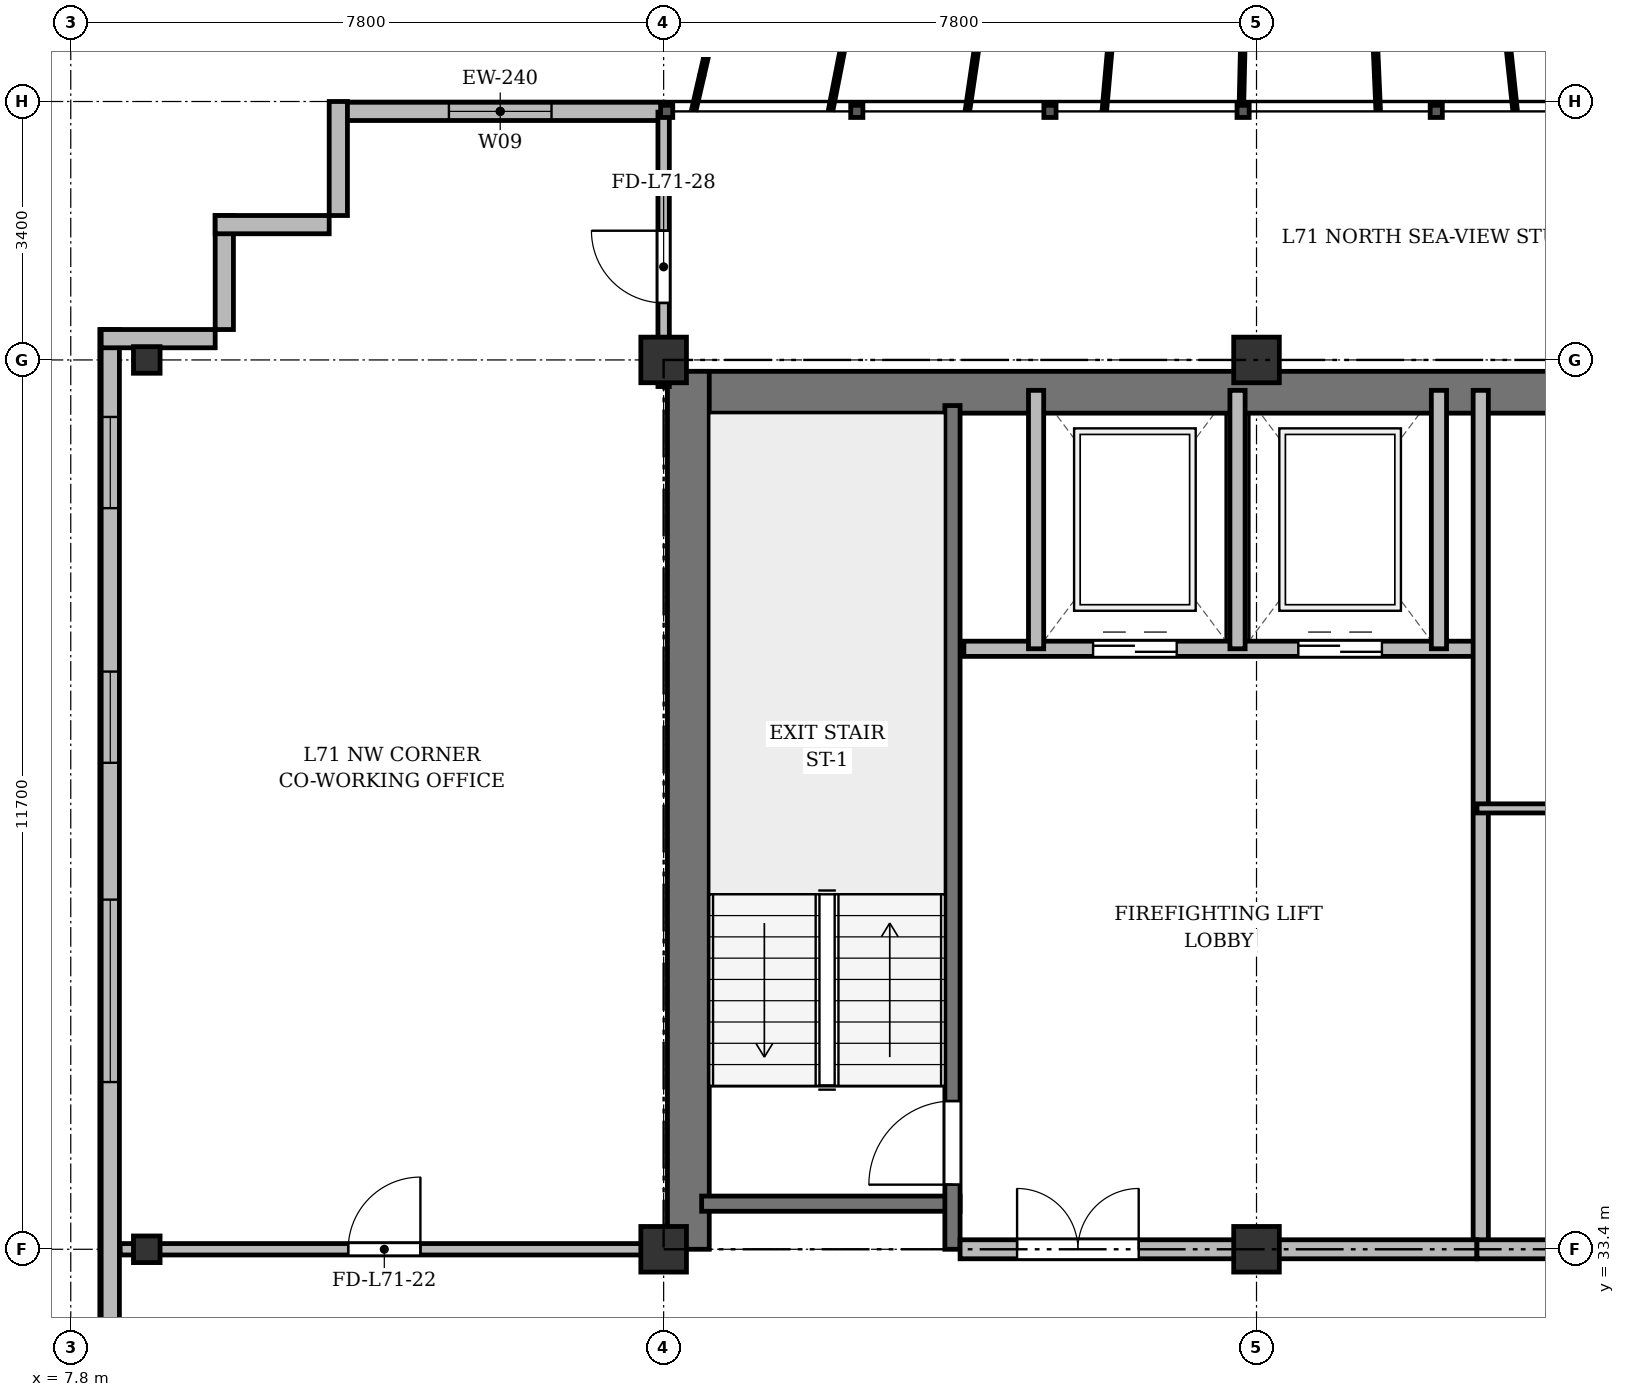
"""IFC4 building model, lengths in metres.
Left out: names, types, materials, properties, quantities, classifications, styles, units other than length and angle.
Written with IfcOpenShell. Run it as: python <this file> out.ifc"""

import sys

from ifc_helpers import new_model, si_unit, direction, frame, frame_2d, origin, origin_2d, place, context, subcontext, project, spatial, rectangle, i_section, extrude, source, transform, mapped, element, fill, save


model = new_model("IFC4")
c1 = context("Model", 3, precision=1e-05, world=origin(), true_north=direction((0.0, 1.0)))
c2 = subcontext(c1, "Body", "Model", "MODEL_VIEW")
j1 = project(units=[si_unit("LENGTHUNIT", "METRE"), si_unit("PLANEANGLEUNIT", "RADIAN")], contexts=[c1])
p1 = place(None, origin())
s1 = spatial("IfcSite", under=j1, at=p1, CompositionType="ELEMENT")
p2 = place(p1, origin())
s2 = spatial("IfcBuilding", under=s1, at=p2, CompositionType="ELEMENT")
p3 = place(p2, frame((0.0, 0.0, 273.9)))
s3 = spatial("IfcBuildingStorey", under=s2, at=p3, CompositionType="ELEMENT", Elevation=273.9)
m1 = source(origin(), c2, "Body", "SweptSolid", [
    extrude(i_section(OverallWidth=0.35, OverallDepth=0.35, WebThickness=0.018, FlangeThickness=0.028, at=origin_2d()), origin(), (0.0, 0.0, 1.0), 3.6),
])
for number, where, z_axis, x_axis in (
    (1, (8.8, 33.4, 0.0), (0.0, 0.0, 1.0), (1.0, 0.0, 0.0)),
    (2, (8.8, 45.1, 0.0), (0.0, 0.0, 1.0), (1.0, 0.0, 0.0)),
):
    element("IfcColumn", number, at=place(p3, frame(where, z_axis=z_axis, x_axis=x_axis)), inside=s3, PredefinedType="COLUMN", context=c2, shape_type="MappedRepresentation", body=[
        mapped(m1, transform((0.0, 0.0, 0.0), x_axis=(1.0, 0.0, 0.0), y_axis=(0.0, 1.0, 0.0), z_axis=(0.0, 0.0, 1.0), scale=1.0)),
    ])
m2 = source(origin(), c2, "Body", "SweptSolid", [
    extrude(rectangle(XDim=0.6, YDim=0.6, at=origin_2d()), origin(), (0.0, 0.0, 1.0), 3.6),
])
for number, where, z_axis, x_axis in (
    (3, (15.6, 33.4, 0.0), (0.0, 0.0, 1.0), (1.0, 0.0, 0.0)),
    (4, (15.6, 45.1, 0.0), (0.0, 0.0, 1.0), (1.0, 0.0, 0.0)),
    (5, (23.4, 33.4, 0.0), (0.0, 0.0, 1.0), (1.0, 0.0, 0.0)),
    (6, (23.4, 45.1, 0.0), (0.0, 0.0, 1.0), (1.0, 0.0, 0.0)),
):
    element("IfcColumn", number, at=place(p3, frame(where, z_axis=z_axis, x_axis=x_axis)), inside=s3, PredefinedType="COLUMN", context=c2, shape_type="MappedRepresentation", body=[
        mapped(m2, transform((0.0, 0.0, 0.0), x_axis=(1.0, 0.0, 0.0), y_axis=(0.0, 1.0, 0.0), z_axis=(0.0, 0.0, 1.0), scale=1.0)),
    ])
p4 = place(p3, frame((11.3, 48.37, 0.0), z_axis=(0.0, 0.0, 1.0), x_axis=(1.0, 0.0, 0.0)))
e7 = element("IfcWall", 7, at=p4, inside=s3, PredefinedType="SOLIDWALL", context=c2, shape_type="SweptSolid", body=[
    extrude(rectangle(XDim=4.3, YDim=0.24, at=frame_2d((2.15, 0.0))), origin(), (0.0, 0.0, 1.0), 3.37),
])
p5 = place(p4, frame((1.475, 0.0, 0.9)))
e8 = element("IfcOpeningElement", 8, at=p5, cuts=e7, PredefinedType="OPENING", context=c2, shape_type="SweptSolid", body=[
    extrude(rectangle(XDim=1.35, YDim=1.5, at=frame_2d((0.675, 0.75))), frame((0.0, 0.13, 0.0), z_axis=(0.0, -1.0, 0.0), x_axis=(1.0, 0.0, 0.0)), (0.0, 0.0, 1.0), 0.26),
])
p6 = place(p3, frame((8.32, 6.5, 0.0), z_axis=(0.0, 0.0, 1.0), x_axis=(0.0, 1.0, 0.0)))
e9 = element("IfcWall", 9, at=p6, inside=s3, PredefinedType="SOLIDWALL", context=c2, shape_type="SweptSolid", body=[
    extrude(rectangle(XDim=39.0, YDim=0.24, at=frame_2d((19.5, 0.0))), origin(), (0.0, 0.0, 1.0), 3.37),
])
p7 = place(p6, frame((1.45, 0.0, 0.92)))
e10 = element("IfcOpeningElement", 10, at=p7, cuts=e9, PredefinedType="OPENING", context=c2, shape_type="SweptSolid", body=[
    extrude(rectangle(XDim=1.2, YDim=1.65, at=frame_2d((0.6, 0.825))), frame((0.0, 0.13, 0.0), z_axis=(0.0, -1.0, 0.0), x_axis=(1.0, 0.0, 0.0)), (0.0, 0.0, 1.0), 0.26),
])
p8 = place(p6, frame((3.7, 0.0, 0.92)))
e11 = element("IfcOpeningElement", 11, at=p8, cuts=e9, PredefinedType="OPENING", context=c2, shape_type="SweptSolid", body=[
    extrude(rectangle(XDim=2.4, YDim=2.1, at=frame_2d((1.2, 1.05))), frame((0.0, 0.13, 0.0), z_axis=(0.0, -1.0, 0.0), x_axis=(1.0, 0.0, 0.0)), (0.0, 0.0, 1.0), 0.26),
])
p9 = place(p6, frame((7.9, 0.0, 0.92)))
e12 = element("IfcOpeningElement", 12, at=p9, cuts=e9, PredefinedType="OPENING", context=c2, shape_type="SweptSolid", body=[
    extrude(rectangle(XDim=2.4, YDim=2.1, at=frame_2d((1.2, 1.05))), frame((0.0, 0.13, 0.0), z_axis=(0.0, -1.0, 0.0), x_axis=(1.0, 0.0, 0.0)), (0.0, 0.0, 1.0), 0.26),
])
p10 = place(p6, frame((15.1, 0.0, 0.92)))
e13 = element("IfcOpeningElement", 13, at=p10, cuts=e9, PredefinedType="OPENING", context=c2, shape_type="SweptSolid", body=[
    extrude(rectangle(XDim=2.4, YDim=2.1, at=frame_2d((1.2, 1.05))), frame((0.0, 0.13, 0.0), z_axis=(0.0, -1.0, 0.0), x_axis=(1.0, 0.0, 0.0)), (0.0, 0.0, 1.0), 0.26),
])
p11 = place(p6, frame((29.1, 0.0, 0.92)))
e14 = element("IfcOpeningElement", 14, at=p11, cuts=e9, PredefinedType="OPENING", context=c2, shape_type="SweptSolid", body=[
    extrude(rectangle(XDim=2.4, YDim=2.1, at=frame_2d((1.2, 1.05))), frame((0.0, 0.13, 0.0), z_axis=(0.0, -1.0, 0.0), x_axis=(1.0, 0.0, 0.0)), (0.0, 0.0, 1.0), 0.26),
])
p12 = place(p6, frame((33.3, 0.0, 0.92)))
e15 = element("IfcOpeningElement", 15, at=p12, cuts=e9, PredefinedType="OPENING", context=c2, shape_type="SweptSolid", body=[
    extrude(rectangle(XDim=1.2, YDim=1.65, at=frame_2d((0.6, 0.825))), frame((0.0, 0.13, 0.0), z_axis=(0.0, -1.0, 0.0), x_axis=(1.0, 0.0, 0.0)), (0.0, 0.0, 1.0), 0.26),
])
p13 = place(p6, frame((36.65, 0.0, 0.92)))
e16 = element("IfcOpeningElement", 16, at=p13, cuts=e9, PredefinedType="OPENING", context=c2, shape_type="SweptSolid", body=[
    extrude(rectangle(XDim=1.2, YDim=1.65, at=frame_2d((0.6, 0.825))), frame((0.0, 0.13, 0.0), z_axis=(0.0, -1.0, 0.0), x_axis=(1.0, 0.0, 0.0)), (0.0, 0.0, 1.0), 0.26),
])
for number, where, z_axis, x_axis in (
    (17, (8.2, 45.38, 0.0), (0.0, 0.0, 1.0), (1.0, 0.0, 0.0)),
    (18, (9.82, 45.5, 0.0), (0.0, 0.0, 1.0), (0.0, 1.0, 0.0)),
    (19, (9.7, 46.88, 0.0), (0.0, 0.0, 1.0), (1.0, 0.0, 0.0)),
    (20, (11.32, 47.0, 0.0), (0.0, 0.0, 1.0), (0.0, 1.0, 0.0)),
):
    element("IfcWall", number, at=place(p3, frame(where, z_axis=z_axis, x_axis=x_axis)), inside=s3, PredefinedType="SOLIDWALL", context=c2, shape_type="SweptSolid", body=[
        extrude(rectangle(XDim=1.5, YDim=0.24, at=frame_2d((0.75, 0.0))), origin(), (0.0, 0.0, 1.0), 3.37),
    ])
p14 = place(p3, frame((15.65, 44.675, 0.0), z_axis=(0.0, 0.0, 1.0), x_axis=(1.0, 0.0, 0.0)))
e21 = element("IfcWall", 21, at=p14, inside=s3, PredefinedType="SHEAR", context=c2, shape_type="SweptSolid", body=[
    extrude(rectangle(XDim=43.1, YDim=0.55, at=frame_2d((21.55, 0.0))), origin(), (0.0, 0.0, 1.0), 3.37),
])
p15 = place(p3, frame((15.925, 33.4, 0.0), z_axis=(0.0, 0.0, 1.0), x_axis=(0.0, 1.0, 0.0)))
e22 = element("IfcWall", 22, at=p15, inside=s3, PredefinedType="SHEAR", context=c2, shape_type="SweptSolid", body=[
    extrude(rectangle(XDim=11.55, YDim=0.55, at=frame_2d((5.775, 0.0))), origin(), (0.0, 0.0, 1.0), 3.37),
])
p16 = place(p3, frame((16.1, 34.0, 0.0), z_axis=(0.0, 0.0, 1.0), x_axis=(1.0, 0.0, 0.0)))
e23 = element("IfcWall", 23, at=p16, inside=s3, PredefinedType="SHEAR", context=c2, shape_type="SweptSolid", body=[
    extrude(rectangle(XDim=3.4, YDim=0.2, at=frame_2d((1.7, 0.0))), origin(), (0.0, 0.0, 1.0), 3.37),
])
p17 = place(p3, frame((19.4, 33.4, 0.0), z_axis=(0.0, 0.0, 1.0), x_axis=(0.0, 1.0, 0.0)))
e24 = element("IfcWall", 24, at=p17, inside=s3, PredefinedType="SHEAR", context=c2, shape_type="SweptSolid", body=[
    extrude(rectangle(XDim=11.1, YDim=0.2, at=frame_2d((5.55, 0.0))), origin(), (0.0, 0.0, 1.0), 3.37),
])
p18 = place(p17, frame((0.85, 0.0, 0.0)))
e25 = element("IfcOpeningElement", 25, at=p18, cuts=e24, PredefinedType="OPENING", context=c2, shape_type="SweptSolid", body=[
    extrude(rectangle(XDim=1.1, YDim=2.15, at=frame_2d((0.55, 1.075))), frame((0.0, 0.11, 0.0), z_axis=(0.0, -1.0, 0.0), x_axis=(1.0, 0.0, 0.0)), (0.0, 0.0, 1.0), 0.22),
])
p19 = place(p3, frame((19.55, 41.3, 0.0), z_axis=(0.0, 0.0, 1.0), x_axis=(1.0, 0.0, 0.0)))
e26 = element("IfcWall", 26, at=p19, inside=s3, PredefinedType="SOLIDWALL", context=c2, shape_type="SweptSolid", body=[
    extrude(rectangle(XDim=6.75, YDim=0.2, at=frame_2d((3.375, 0.0))), origin(), (0.0, 0.0, 1.0), 3.37),
])
p20 = place(p19, frame((1.7, 0.0, 0.0)))
e27 = element("IfcOpeningElement", 27, at=p20, cuts=e26, PredefinedType="OPENING", context=c2, shape_type="SweptSolid", body=[
    extrude(rectangle(XDim=1.1, YDim=2.15, at=frame_2d((0.55, 1.075))), frame((0.0, 0.11, 0.0), z_axis=(0.0, -1.0, 0.0), x_axis=(1.0, 0.0, 0.0)), (0.0, 0.0, 1.0), 0.22),
])
p21 = place(p19, frame((4.4, 0.0, 0.0)))
e28 = element("IfcOpeningElement", 28, at=p21, cuts=e26, PredefinedType="OPENING", context=c2, shape_type="SweptSolid", body=[
    extrude(rectangle(XDim=1.1, YDim=2.15, at=frame_2d((0.55, 1.075))), frame((0.0, 0.11, 0.0), z_axis=(0.0, -1.0, 0.0), x_axis=(1.0, 0.0, 0.0)), (0.0, 0.0, 1.0), 0.22),
])
for number, where, z_axis, x_axis in (
    (29, (20.5, 41.3, 0.0), (0.0, 0.0, 1.0), (0.0, 1.0, 0.0)),
    (30, (23.15, 41.3, 0.0), (0.0, 0.0, 1.0), (0.0, 1.0, 0.0)),
    (31, (25.8, 41.3, 0.0), (0.0, 0.0, 1.0), (0.0, 1.0, 0.0)),
):
    element("IfcWall", number, at=place(p3, frame(where, z_axis=z_axis, x_axis=x_axis)), inside=s3, PredefinedType="SOLIDWALL", context=c2, shape_type="SweptSolid", body=[
        extrude(rectangle(XDim=3.4, YDim=0.2, at=frame_2d((1.7, 0.0))), origin(), (0.0, 0.0, 1.0), 3.37),
    ])
p22 = place(p3, frame((26.35, 33.4, 0.0), z_axis=(0.0, 0.0, 1.0), x_axis=(0.0, 1.0, 0.0)))
e32 = element("IfcWall", 32, at=p22, inside=s3, PredefinedType="SOLIDWALL", context=c2, shape_type="SweptSolid", body=[
    extrude(rectangle(XDim=11.3, YDim=0.2, at=frame_2d((5.65, 0.0))), origin(), (0.0, 0.0, 1.0), 2.92),
])
p23 = place(p3, frame((19.5, 33.4, 0.0), z_axis=(0.0, 0.0, 1.0), x_axis=(1.0, 0.0, 0.0)))
e33 = element("IfcWall", 33, at=p23, inside=s3, PredefinedType="PARTITIONING", context=c2, shape_type="SweptSolid", body=[
    extrude(rectangle(XDim=6.8, YDim=0.25, at=frame_2d((3.4, 0.0))), origin(), (0.0, 0.0, 1.0), 2.92),
])
p24 = place(p23, frame((0.75, 0.0, 0.0)))
e34 = element("IfcOpeningElement", 34, at=p24, cuts=e33, PredefinedType="OPENING", context=c2, shape_type="SweptSolid", body=[
    extrude(rectangle(XDim=1.6, YDim=2.2, at=frame_2d((0.8, 1.1))), frame((0.0, 0.135, 0.0), z_axis=(0.0, -1.0, 0.0), x_axis=(1.0, 0.0, 0.0)), (0.0, 0.0, 1.0), 0.27),
])
p25 = place(p3, frame((26.3, 39.2, 0.0), z_axis=(0.0, 0.0, 1.0), x_axis=(1.0, 0.0, 0.0)))
e35 = element("IfcWall", 35, at=p25, inside=s3, PredefinedType="PARTITIONING", context=c2, shape_type="SweptSolid", body=[
    extrude(rectangle(XDim=7.0, YDim=0.12, at=frame_2d((3.5, 0.0))), origin(), (0.0, 0.0, 1.0), 2.87),
])
p26 = place(p25, frame((2.6, 0.0, 0.0)))
e36 = element("IfcOpeningElement", 36, at=p26, cuts=e35, PredefinedType="OPENING", context=c2, shape_type="SweptSolid", body=[
    extrude(rectangle(XDim=0.95, YDim=2.15, at=frame_2d((0.475, 1.075))), frame((0.0, 0.07, 0.0), z_axis=(0.0, -1.0, 0.0), x_axis=(1.0, 0.0, 0.0)), (0.0, 0.0, 1.0), 0.14),
])
p27 = place(p3, frame((26.3, 33.4, 0.0), z_axis=(0.0, 0.0, 1.0), x_axis=(1.0, 0.0, 0.0)))
e37 = element("IfcWall", 37, at=p27, inside=s3, PredefinedType="PARTITIONING", context=c2, shape_type="SweptSolid", body=[
    extrude(rectangle(XDim=7.0, YDim=0.25, at=frame_2d((3.5, 0.0))), origin(), (0.0, 0.0, 1.0), 2.92),
])
p28 = place(p27, frame((1.35, 0.0, 0.0)))
e38 = element("IfcOpeningElement", 38, at=p28, cuts=e37, PredefinedType="OPENING", context=c2, shape_type="SweptSolid", body=[
    extrude(rectangle(XDim=0.95, YDim=2.15, at=frame_2d((0.475, 1.075))), frame((0.0, 0.135, 0.0), z_axis=(0.0, -1.0, 0.0), x_axis=(1.0, 0.0, 0.0)), (0.0, 0.0, 1.0), 0.27),
])
p29 = place(p3, frame((8.45, 33.4, 0.0), z_axis=(0.0, 0.0, 1.0), x_axis=(1.0, 0.0, 0.0)))
e39 = element("IfcWall", 39, at=p29, inside=s3, PredefinedType="PARTITIONING", context=c2, shape_type="SweptSolid", body=[
    extrude(rectangle(XDim=7.15, YDim=0.15, at=frame_2d((3.575, 0.0))), origin(), (0.0, 0.0, 1.0), 2.92),
])
p30 = place(p29, frame((3.0, 0.0, 0.0)))
e40 = element("IfcOpeningElement", 40, at=p30, cuts=e39, PredefinedType="OPENING", context=c2, shape_type="SweptSolid", body=[
    extrude(rectangle(XDim=0.95, YDim=2.15, at=frame_2d((0.475, 1.075))), frame((0.0, 0.085, 0.0), z_axis=(0.0, -1.0, 0.0), x_axis=(1.0, 0.0, 0.0)), (0.0, 0.0, 1.0), 0.17),
])
p31 = place(p3, frame((15.6, 44.75, 0.0), z_axis=(0.0, 0.0, 1.0), x_axis=(0.0, 1.0, 0.0)))
e41 = element("IfcWall", 41, at=p31, inside=s3, PredefinedType="PARTITIONING", context=c2, shape_type="SweptSolid", body=[
    extrude(rectangle(XDim=3.61, YDim=0.15, at=frame_2d((1.805, 0.0))), origin(), (0.0, 0.0, 1.0), 2.87),
])
p32 = place(p31, frame((1.1, 0.0, 0.0)))
e42 = element("IfcOpeningElement", 42, at=p32, cuts=e41, PredefinedType="OPENING", context=c2, shape_type="SweptSolid", body=[
    extrude(rectangle(XDim=0.95, YDim=2.15, at=frame_2d((0.475, 1.075))), frame((0.0, 0.085, 0.0), z_axis=(0.0, -1.0, 0.0), x_axis=(1.0, 0.0, 0.0)), (0.0, 0.0, 1.0), 0.17),
])
m3 = source(origin(), c2, "Body", "SweptSolid", [
    extrude(rectangle(XDim=1.35, YDim=1.5, at=frame_2d((0.675, 0.75))), frame((0.0, 0.03, 0.0), z_axis=(0.0, -1.0, 0.0), x_axis=(1.0, 0.0, 0.0)), (0.0, 0.0, 1.0), 0.06),
])
p33 = place(p5, origin())
e43 = element("IfcWindow", 43, at=p33, inside=s3, PartitioningType="SINGLE_PANEL", PredefinedType="WINDOW", context=c2, shape_type="MappedRepresentation", body=[
    mapped(m3, transform((0.0, 0.0, 0.0), x_axis=(1.0, 0.0, 0.0), y_axis=(0.0, 1.0, 0.0), z_axis=(0.0, 0.0, 1.0), scale=1.0)),
])
fill(e8, e43)
m4 = source(origin(), c2, "Body", "SweptSolid", [
    extrude(rectangle(XDim=2.4, YDim=2.1, at=frame_2d((1.2, 1.05))), frame((0.0, 0.03, 0.0), z_axis=(0.0, -1.0, 0.0), x_axis=(1.0, 0.0, 0.0)), (0.0, 0.0, 1.0), 0.06),
])
p34 = place(p11, origin())
e44 = element("IfcWindow", 44, at=p34, inside=s3, PartitioningType="SINGLE_PANEL", PredefinedType="WINDOW", context=c2, shape_type="MappedRepresentation", body=[
    mapped(m4, transform((0.0, 0.0, 0.0), x_axis=(1.0, 0.0, 0.0), y_axis=(0.0, 1.0, 0.0), z_axis=(0.0, 0.0, 1.0), scale=1.0)),
])
fill(e14, e44)
m5 = source(origin(), c2, "Body", "SweptSolid", [
    extrude(rectangle(XDim=1.2, YDim=1.65, at=frame_2d((0.6, 0.825))), frame((0.0, 0.03, 0.0), z_axis=(0.0, -1.0, 0.0), x_axis=(1.0, 0.0, 0.0)), (0.0, 0.0, 1.0), 0.06),
])
p35 = place(p12, origin())
e45 = element("IfcWindow", 45, at=p35, inside=s3, PartitioningType="SINGLE_PANEL", PredefinedType="WINDOW", context=c2, shape_type="MappedRepresentation", body=[
    mapped(m5, transform((0.0, 0.0, 0.0), x_axis=(1.0, 0.0, 0.0), y_axis=(0.0, 1.0, 0.0), z_axis=(0.0, 0.0, 1.0), scale=1.0)),
])
fill(e15, e45)
p36 = place(p13, origin())
e46 = element("IfcWindow", 46, at=p36, inside=s3, PartitioningType="SINGLE_PANEL", PredefinedType="WINDOW", context=c2, shape_type="MappedRepresentation", body=[
    mapped(m5, transform((0.0, 0.0, 0.0), x_axis=(1.0, 0.0, 0.0), y_axis=(0.0, 1.0, 0.0), z_axis=(0.0, 0.0, 1.0), scale=1.0)),
])
fill(e16, e46)
m6 = source(origin(), c2, "Body", "SweptSolid", [
    extrude(rectangle(XDim=1.1, YDim=2.15, at=frame_2d((0.55, 1.075))), frame((0.0, 0.025, 0.0), z_axis=(0.0, -1.0, 0.0), x_axis=(1.0, 0.0, 0.0)), (0.0, 0.0, 1.0), 0.05),
])
p37 = place(p18, origin())
e47 = element("IfcDoor", 47, at=p37, inside=s3, OperationType="SINGLE_SWING_LEFT", PredefinedType="DOOR", context=c2, shape_type="MappedRepresentation", body=[
    mapped(m6, transform((0.0, 0.0, 0.0), x_axis=(1.0, 0.0, 0.0), y_axis=(0.0, 1.0, 0.0), z_axis=(0.0, 0.0, 1.0), scale=1.0)),
])
fill(e25, e47)
p38 = place(p20, origin())
e48 = element("IfcDoor", 48, at=p38, inside=s3, OperationType="DOUBLE_DOOR_SLIDING", PredefinedType="DOOR", context=c2, shape_type="MappedRepresentation", body=[
    mapped(m6, transform((0.0, 0.0, 0.0), x_axis=(1.0, 0.0, 0.0), y_axis=(0.0, 1.0, 0.0), z_axis=(0.0, 0.0, 1.0), scale=1.0)),
])
fill(e27, e48)
p39 = place(p21, origin())
e49 = element("IfcDoor", 49, at=p39, inside=s3, OperationType="DOUBLE_DOOR_SLIDING", PredefinedType="DOOR", context=c2, shape_type="MappedRepresentation", body=[
    mapped(m6, transform((0.0, 0.0, 0.0), x_axis=(1.0, 0.0, 0.0), y_axis=(0.0, 1.0, 0.0), z_axis=(0.0, 0.0, 1.0), scale=1.0)),
])
fill(e28, e49)
m7 = source(origin(), c2, "Body", "SweptSolid", [
    extrude(rectangle(XDim=1.6, YDim=2.2, at=frame_2d((0.8, 1.1))), frame((0.0, 0.025, 0.0), z_axis=(0.0, -1.0, 0.0), x_axis=(1.0, 0.0, 0.0)), (0.0, 0.0, 1.0), 0.05),
])
p40 = place(p24, origin())
e50 = element("IfcDoor", 50, at=p40, inside=s3, OperationType="DOUBLE_DOOR_SINGLE_SWING", PredefinedType="DOOR", context=c2, shape_type="MappedRepresentation", body=[
    mapped(m7, transform((0.0, 0.0, 0.0), x_axis=(1.0, 0.0, 0.0), y_axis=(0.0, 1.0, 0.0), z_axis=(0.0, 0.0, 1.0), scale=1.0)),
])
fill(e34, e50)
m8 = source(origin(), c2, "Body", "SweptSolid", [
    extrude(rectangle(XDim=0.95, YDim=2.15, at=frame_2d((0.475, 1.075))), frame((0.0, 0.025, 0.0), z_axis=(0.0, -1.0, 0.0), x_axis=(1.0, 0.0, 0.0)), (0.0, 0.0, 1.0), 0.05),
])
p41 = place(p30, origin())
e51 = element("IfcDoor", 51, at=p41, inside=s3, OperationType="SINGLE_SWING_RIGHT", PredefinedType="DOOR", context=c2, shape_type="MappedRepresentation", body=[
    mapped(m8, transform((0.0, 0.0, 0.0), x_axis=(1.0, 0.0, 0.0), y_axis=(0.0, 1.0, 0.0), z_axis=(0.0, 0.0, 1.0), scale=1.0)),
])
fill(e40, e51)
p42 = place(p32, origin())
e52 = element("IfcDoor", 52, at=p42, inside=s3, OperationType="SINGLE_SWING_RIGHT", PredefinedType="DOOR", context=c2, shape_type="MappedRepresentation", body=[
    mapped(m8, transform((0.0, 0.0, 0.0), x_axis=(1.0, 0.0, 0.0), y_axis=(0.0, 1.0, 0.0), z_axis=(0.0, 0.0, 1.0), scale=1.0)),
])
fill(e42, e52)
save(model, sys.argv[1])
